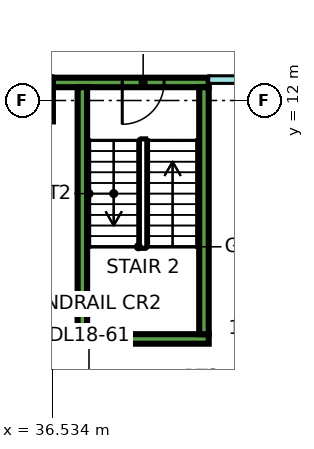
"""IFC4 building model, lengths in metres.
Left out: names, types, materials, properties, quantities, classifications, styles, units other than length and angle.
Written with IfcOpenShell. Run it as: python <this file> out.ifc"""

import sys

from ifc_helpers import new_model, si_unit, direction, frame, frame_2d, origin, origin_2d, place, context, subcontext, project, spatial, rectangle, extrude, element, fill, save


model = new_model("IFC4")
c1 = context("Model", 3, precision=1e-05, world=origin(), true_north=direction((0.0, 1.0)))
c2 = subcontext(c1, "Body", "Model", "MODEL_VIEW")
j1 = project(units=[si_unit("LENGTHUNIT", "METRE"), si_unit("PLANEANGLEUNIT", "RADIAN")], contexts=[c1])
p1 = place(None, origin())
s1 = spatial("IfcSite", under=j1, at=p1, CompositionType="ELEMENT")
p2 = place(p1, origin())
s2 = spatial("IfcBuilding", under=s1, at=p2, CompositionType="ELEMENT")
p3 = place(p2, frame((0.0, 0.0, 82.65)))
s3 = spatial("IfcBuildingStorey", under=s2, at=p3, CompositionType="ELEMENT", Elevation=82.65)
p4 = place(p3, frame((36.0, 12.0, 0.0), z_axis=(0.0, 0.0, 1.0), x_axis=(1.0, 0.0, 0.0)))
e1 = element("IfcColumn", 1, at=p4, inside=s3, PredefinedType="COLUMN", context=c2, shape_type="SweptSolid", body=[
    extrude(rectangle(XDim=1.1, YDim=1.1, at=origin_2d()), origin(), (0.0, 0.0, 1.0), 3.75),
])
p5 = place(p3, frame((37.2, 5.725, 0.0), z_axis=(0.0, 0.0, 1.0), x_axis=(1.0, 0.0, 0.0)))
e2 = element("IfcWall", 2, at=p5, inside=s3, PredefinedType="SHEAR", context=c2, shape_type="SweptSolid", body=[
    extrude(rectangle(XDim=3.45, YDim=0.25, at=frame_2d((1.725, 0.0))), origin(), (0.0, 0.0, 1.0), 3.75),
])
p6 = place(p3, frame((36.55, 12.475, 0.0), z_axis=(0.0, 0.0, 1.0), x_axis=(1.0, 0.0, 0.0)))
e3 = element("IfcWall", 3, at=p6, inside=s3, PredefinedType="SHEAR", context=c2, shape_type="SweptSolid", body=[
    extrude(rectangle(XDim=4.1, YDim=0.25, at=frame_2d((2.05, 0.0))), origin(), (0.0, 0.0, 1.0), 3.75),
])
p7 = place(p6, frame((1.825, 0.0, 0.0)))
e4 = element("IfcOpeningElement", 4, at=p7, cuts=e3, PredefinedType="OPENING", context=c2, shape_type="SweptSolid", body=[
    extrude(rectangle(XDim=1.1, YDim=2.2, at=frame_2d((0.55, 1.1))), frame((0.0, 0.135, 0.0), z_axis=(0.0, -1.0, 0.0), x_axis=(1.0, 0.0, 0.0)), (0.0, 0.0, 1.0), 0.27),
])
for number, where, z_axis, x_axis in (
    (5, (37.325, 5.85, 0.0), (0.0, 0.0, 1.0), (0.0, 1.0, 0.0)),
    (6, (40.525, 5.85, 0.0), (0.0, 0.0, 1.0), (0.0, 1.0, 0.0)),
):
    element("IfcWall", number, at=place(p3, frame(where, z_axis=z_axis, x_axis=x_axis)), inside=s3, PredefinedType="SHEAR", context=c2, shape_type="SweptSolid", body=[
        extrude(rectangle(XDim=6.5, YDim=0.25, at=frame_2d((3.25, 0.0))), origin(), (0.0, 0.0, 1.0), 3.75),
    ])
p8 = place(p3, frame((34.0, 12.55, 0.0), z_axis=(0.0, 0.0, 1.0), x_axis=(1.0, 0.0, 0.0)))
e7 = element("IfcWall", 7, at=p8, inside=s3, PredefinedType="PARTITIONING", context=c2, shape_type="SweptSolid", body=[
    extrude(rectangle(XDim=2.551, YDim=0.2, at=frame_2d((1.275, 0.0))), origin(), (0.0, 0.0, 1.0), 3.3),
])
p9 = place(p3, frame((40.65, 12.55, 0.0), z_axis=(0.0, 0.0, 1.0), x_axis=(1.0, 0.0, 0.0)))
e8 = element("IfcWall", 8, at=p9, inside=s3, PredefinedType="PARTITIONING", context=c2, shape_type="SweptSolid", body=[
    extrude(rectangle(XDim=28.125, YDim=0.2, at=frame_2d((14.062, 0.0))), origin(), (0.0, 0.0, 1.0), 3.3),
])
p10 = place(p9, frame((11.4, 0.0, 0.0)))
e9 = element("IfcOpeningElement", 9, at=p10, cuts=e8, PredefinedType="OPENING", context=c2, shape_type="SweptSolid", body=[
    extrude(rectangle(XDim=1.0, YDim=2.1, at=frame_2d((0.5, 1.05))), frame((0.0, 0.11, 0.0), z_axis=(0.0, -1.0, 0.0), x_axis=(1.0, 0.0, 0.0)), (0.0, 0.0, 1.0), 0.22),
])
p11 = place(p9, frame((1.05, 0.0, 0.0)))
e10 = element("IfcOpeningElement", 10, at=p11, cuts=e8, PredefinedType="OPENING", context=c2, shape_type="SweptSolid", body=[
    extrude(rectangle(XDim=1.0, YDim=2.1, at=frame_2d((0.5, 1.05))), frame((0.0, 0.11, 0.0), z_axis=(0.0, -1.0, 0.0), x_axis=(1.0, 0.0, 0.0)), (0.0, 0.0, 1.0), 0.22),
])
p12 = place(p7, frame((1.1, 0.0, 0.0), z_axis=(0.0, 0.0, 1.0), x_axis=(-1.0, 0.0, 0.0)))
e11 = element("IfcDoor", 11, at=p12, inside=s3, OperationType="SINGLE_SWING_LEFT", PredefinedType="DOOR", context=c2, shape_type="SweptSolid", body=[
    extrude(rectangle(XDim=1.1, YDim=2.2, at=frame_2d((0.55, 1.1))), frame((0.0, 0.025, 0.0), z_axis=(0.0, -1.0, 0.0), x_axis=(1.0, 0.0, 0.0)), (0.0, 0.0, 1.0), 0.05),
])
fill(e4, e11)
save(model, sys.argv[1])
